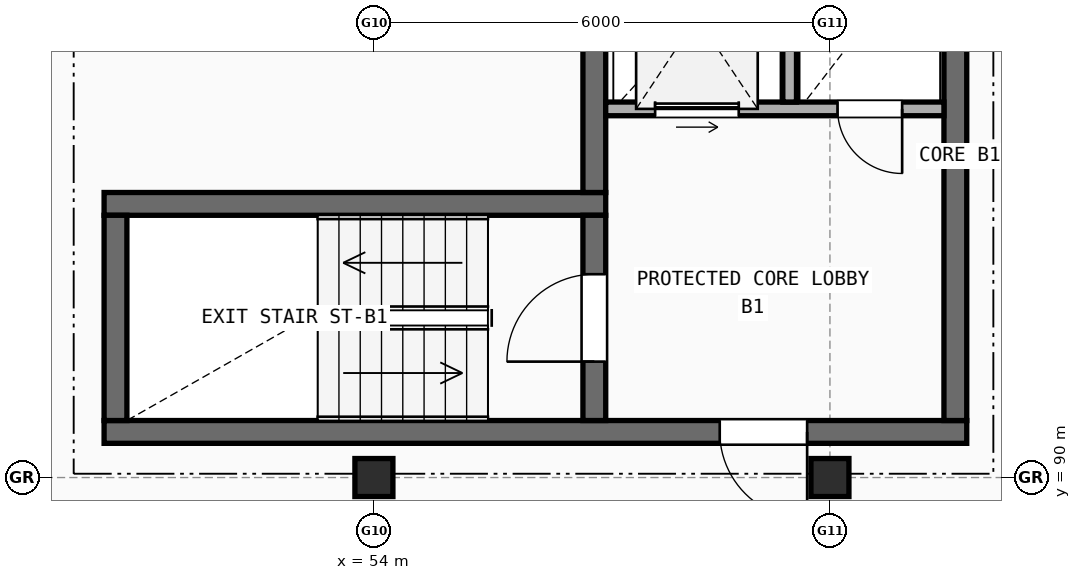
"""IFC4 building model, lengths in metres.
Left out: names, types, materials, properties, quantities, classifications, styles, units other than length and angle.
Written with IfcOpenShell. Run it as: python <this file> out.ifc"""

import sys

from ifc_helpers import new_model, si_unit, direction, frame, frame_2d, origin, origin_2d, place, context, subcontext, project, spatial, rectangle, extrude, element, fill, save


model = new_model("IFC4")
c1 = context("Model", 3, precision=1e-05, world=origin(), true_north=direction((0.0, 1.0)))
c2 = subcontext(c1, "Body", "Model", "MODEL_VIEW")
j1 = project(units=[si_unit("LENGTHUNIT", "METRE"), si_unit("PLANEANGLEUNIT", "RADIAN")], contexts=[c1])
p1 = place(None, origin())
s1 = spatial("IfcSite", under=j1, at=p1, CompositionType="ELEMENT")
p2 = place(p1, origin())
s2 = spatial("IfcBuilding", under=s1, at=p2, CompositionType="ELEMENT")
p3 = place(p2, frame((0.0, 0.0, 26.9)))
s3 = spatial("IfcBuildingStorey", under=s2, at=p3, CompositionType="ELEMENT", Elevation=26.9)
for number, where, z_axis, x_axis in (
    (1, (54.0, 90.0, 0.0), (0.0, 0.0, 1.0), (1.0, 0.0, 0.0)),
    (2, (60.0, 90.0, 0.0), (0.0, 0.0, 1.0), (1.0, 0.0, 0.0)),
):
    element("IfcColumn", number, at=place(p3, frame(where, z_axis=z_axis, x_axis=x_axis)), inside=s3, PredefinedType="COLUMN", context=c2, shape_type="SweptSolid", body=[
        extrude(rectangle(XDim=0.5, YDim=0.5, at=origin_2d()), origin(), (0.0, 0.0, 1.0), 2.98),
    ])
p4 = place(p3, frame((50.45, 90.6, 0.0), z_axis=(0.0, 0.0, 1.0), x_axis=(1.0, 0.0, 0.0)))
e3 = element("IfcWall", 3, at=p4, inside=s3, PredefinedType="SHEAR", context=c2, shape_type="SweptSolid", body=[
    extrude(rectangle(XDim=11.35, YDim=0.3, at=frame_2d((5.675, 0.0))), origin(), (0.0, 0.0, 1.0), 2.98),
])
p5 = place(p4, frame((8.1, 0.0, 0.0)))
e4 = element("IfcOpeningElement", 4, at=p5, cuts=e3, PredefinedType="OPENING", context=c2, shape_type="SweptSolid", body=[
    extrude(rectangle(XDim=1.15, YDim=2.15, at=frame_2d((0.575, 1.075))), frame((0.0, 0.16, 0.0), z_axis=(0.0, -1.0, 0.0), x_axis=(1.0, 0.0, 0.0)), (0.0, 0.0, 1.0), 0.32),
])
p6 = place(p3, frame((57.05, 93.6, 0.0), z_axis=(0.0, 0.0, 1.0), x_axis=(-1.0, 0.0, 0.0)))
e5 = element("IfcWall", 5, at=p6, inside=s3, PredefinedType="SHEAR", context=c2, shape_type="SweptSolid", body=[
    extrude(rectangle(XDim=6.6, YDim=0.3, at=frame_2d((3.3, 0.0))), origin(), (0.0, 0.0, 1.0), 2.98),
])
p7 = place(p3, frame((50.6, 93.45, 0.0), z_axis=(0.0, 0.0, 1.0), x_axis=(0.0, -1.0, 0.0)))
e6 = element("IfcWall", 6, at=p7, inside=s3, PredefinedType="SHEAR", context=c2, shape_type="SweptSolid", body=[
    extrude(rectangle(XDim=2.7, YDim=0.3, at=frame_2d((1.35, 0.0))), origin(), (0.0, 0.0, 1.0), 2.98),
])
p8 = place(p3, frame((56.9, 90.75, 0.0), z_axis=(0.0, 0.0, 1.0), x_axis=(0.0, 1.0, 0.0)))
e7 = element("IfcWall", 7, at=p8, inside=s3, PredefinedType="SHEAR", context=c2, shape_type="SweptSolid", body=[
    extrude(rectangle(XDim=2.7, YDim=0.3, at=frame_2d((1.35, 0.0))), origin(), (0.0, 0.0, 1.0), 2.98),
])
p9 = place(p8, frame((0.775, 0.0, 0.0)))
e8 = element("IfcOpeningElement", 8, at=p9, cuts=e7, PredefinedType="OPENING", context=c2, shape_type="SweptSolid", body=[
    extrude(rectangle(XDim=1.15, YDim=2.15, at=frame_2d((0.575, 1.075))), frame((0.0, 0.16, 0.0), z_axis=(0.0, -1.0, 0.0), x_axis=(1.0, 0.0, 0.0)), (0.0, 0.0, 1.0), 0.32),
])
p10 = place(p3, frame((61.65, 90.75, 0.0), z_axis=(0.0, 0.0, 1.0), x_axis=(0.0, 1.0, 0.0)))
e9 = element("IfcWall", 9, at=p10, inside=s3, PredefinedType="SHEAR", context=c2, shape_type="SweptSolid", body=[
    extrude(rectangle(XDim=6.45, YDim=0.3, at=frame_2d((3.225, 0.0))), origin(), (0.0, 0.0, 1.0), 2.98),
])
p11 = place(p3, frame((56.9, 93.75, 0.0), z_axis=(0.0, 0.0, 1.0), x_axis=(0.0, 1.0, 0.0)))
e10 = element("IfcWall", 10, at=p11, inside=s3, PredefinedType="SHEAR", context=c2, shape_type="SweptSolid", body=[
    extrude(rectangle(XDim=3.45, YDim=0.3, at=frame_2d((1.725, 0.0))), origin(), (0.0, 0.0, 1.0), 2.98),
])
p12 = place(p3, frame((57.05, 94.85, 0.0), z_axis=(0.0, 0.0, 1.0), x_axis=(1.0, 0.0, 0.0)))
e11 = element("IfcWall", 11, at=p12, inside=s3, PredefinedType="SOLIDWALL", context=c2, shape_type="SweptSolid", body=[
    extrude(rectangle(XDim=4.45, YDim=0.18, at=frame_2d((2.225, 0.0))), origin(), (0.0, 0.0, 1.0), 2.98),
])
p13 = place(p12, frame((0.65, 0.0, 0.0)))
e12 = element("IfcOpeningElement", 12, at=p13, cuts=e11, PredefinedType="OPENING", context=c2, shape_type="SweptSolid", body=[
    extrude(rectangle(XDim=1.1, YDim=2.15, at=frame_2d((0.55, 1.075))), frame((0.0, 0.1, 0.0), z_axis=(0.0, -1.0, 0.0), x_axis=(1.0, 0.0, 0.0)), (0.0, 0.0, 1.0), 0.2),
])
p14 = place(p12, frame((3.05, 0.0, 0.0)))
e13 = element("IfcOpeningElement", 13, at=p14, cuts=e11, PredefinedType="OPENING", context=c2, shape_type="SweptSolid", body=[
    extrude(rectangle(XDim=0.85, YDim=2.1, at=frame_2d((0.425, 1.05))), frame((0.0, 0.1, 0.0), z_axis=(0.0, -1.0, 0.0), x_axis=(1.0, 0.0, 0.0)), (0.0, 0.0, 1.0), 0.2),
])
p15 = place(p3, frame((59.47, 94.94, 0.0), z_axis=(0.0, 0.0, 1.0), x_axis=(0.0, 1.0, 0.0)))
e14 = element("IfcWall", 14, at=p15, inside=s3, PredefinedType="SOLIDWALL", context=c2, shape_type="SweptSolid", body=[
    extrude(rectangle(XDim=2.26, YDim=0.18, at=frame_2d((1.13, 0.0))), origin(), (0.0, 0.0, 1.0), 2.98),
])
p16 = place(p5, origin())
e15 = element("IfcDoor", 15, at=p16, inside=s3, OperationType="SINGLE_SWING_RIGHT", PredefinedType="DOOR", context=c2, shape_type="SweptSolid", body=[
    extrude(rectangle(XDim=1.15, YDim=2.15, at=frame_2d((0.575, 1.075))), frame((0.0, 0.025, 0.0), z_axis=(0.0, -1.0, 0.0), x_axis=(1.0, 0.0, 0.0)), (0.0, 0.0, 1.0), 0.05),
])
fill(e4, e15)
p17 = place(p9, origin())
e16 = element("IfcDoor", 16, at=p17, inside=s3, OperationType="SINGLE_SWING_LEFT", PredefinedType="DOOR", context=c2, shape_type="SweptSolid", body=[
    extrude(rectangle(XDim=1.15, YDim=2.15, at=frame_2d((0.575, 1.075))), frame((0.0, 0.025, 0.0), z_axis=(0.0, -1.0, 0.0), x_axis=(1.0, 0.0, 0.0)), (0.0, 0.0, 1.0), 0.05),
])
fill(e8, e16)
p18 = place(p13, origin())
e17 = element("IfcDoor", 17, at=p18, inside=s3, OperationType="SLIDING_TO_LEFT", PredefinedType="DOOR", context=c2, shape_type="SweptSolid", body=[
    extrude(rectangle(XDim=1.1, YDim=2.15, at=frame_2d((0.55, 1.075))), frame((0.0, 0.025, 0.0), z_axis=(0.0, -1.0, 0.0), x_axis=(1.0, 0.0, 0.0)), (0.0, 0.0, 1.0), 0.05),
])
fill(e12, e17)
p19 = place(p14, frame((0.85, 0.0, 0.0), z_axis=(0.0, 0.0, 1.0), x_axis=(-1.0, 0.0, 0.0)))
e18 = element("IfcDoor", 18, at=p19, inside=s3, OperationType="SINGLE_SWING_RIGHT", PredefinedType="DOOR", context=c2, shape_type="SweptSolid", body=[
    extrude(rectangle(XDim=0.85, YDim=2.1, at=frame_2d((0.425, 1.05))), frame((0.0, 0.025, 0.0), z_axis=(0.0, -1.0, 0.0), x_axis=(1.0, 0.0, 0.0)), (0.0, 0.0, 1.0), 0.05),
])
fill(e13, e18)
save(model, sys.argv[1])
